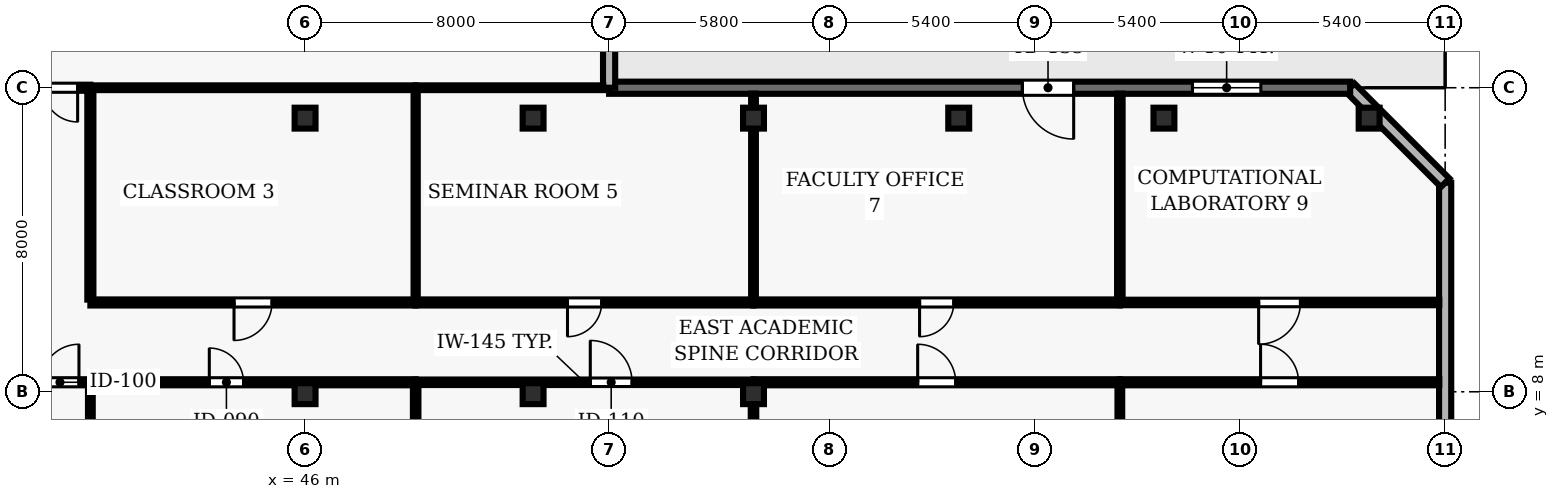
"""IFC4 building model, lengths in metres.
Left out: names, types, materials, properties, quantities, classifications, styles, units other than length and angle.
Written with IfcOpenShell. Run it as: python <this file> out.ifc"""

import sys

from ifc_helpers import new_model, si_unit, direction, frame, frame_2d, origin, origin_2d, place, context, subcontext, project, spatial, rectangle, hollow_rectangle, extrude, element, fill, save


model = new_model("IFC4")
c1 = context("Model", 3, precision=1e-05, world=origin(), true_north=direction((0.0, 1.0)))
c2 = subcontext(c1, "Body", "Model", "MODEL_VIEW")
j1 = project(units=[si_unit("LENGTHUNIT", "METRE"), si_unit("PLANEANGLEUNIT", "RADIAN")], contexts=[c1])
p1 = place(None, origin())
s1 = spatial("IfcSite", under=j1, at=p1, CompositionType="ELEMENT")
p2 = place(p1, origin())
s2 = spatial("IfcBuilding", under=s1, at=p2, CompositionType="ELEMENT")
p3 = place(p2, frame((0.0, 0.0, 26.0)))
s3 = spatial("IfcBuildingStorey", under=s2, at=p3, CompositionType="ELEMENT", Elevation=26.0)
for number, where, z_axis, x_axis in (
    (1, (46.0, 7.95, 0.0), (0.0, 0.0, 1.0), (1.0, 0.0, 0.0)),
    (2, (46.0, 15.2, 0.0), (0.0, 0.0, 1.0), (1.0, 0.0, 0.0)),
    (3, (52.0, 7.95, 0.0), (0.0, 0.0, 1.0), (1.0, 0.0, 0.0)),
    (4, (52.0, 15.2, 0.0), (0.0, 0.0, 1.0), (1.0, 0.0, 0.0)),
    (5, (57.8, 7.95, 0.0), (0.0, 0.0, 1.0), (1.0, 0.0, 0.0)),
    (6, (57.8, 15.2, 0.0), (0.0, 0.0, 1.0), (1.0, 0.0, 0.0)),
    (7, (63.2, 15.2, 0.0), (0.0, 0.0, 1.0), (1.0, 0.0, 0.0)),
    (8, (68.6, 15.2, 0.0), (0.0, 0.0, 1.0), (1.0, 0.0, 0.0)),
    (9, (74.0, 15.2, 0.0), (0.0, 0.0, 1.0), (1.0, 0.0, 0.0)),
):
    element("IfcColumn", number, at=place(p3, frame(where, z_axis=z_axis, x_axis=x_axis)), inside=s3, PredefinedType="COLUMN", context=c2, shape_type="SweptSolid", body=[
        extrude(hollow_rectangle(XDim=0.55, YDim=0.55, WallThickness=0.025, at=origin_2d()), origin(), (0.0, 0.0, 1.0), 5.0),
    ])
p4 = place(p3, frame((76.0, 2.5, 0.0), z_axis=(0.0, 0.0, 1.0), x_axis=(0.0, 1.0, 0.0)))
e10 = element("IfcWall", 10, at=p4, inside=s3, PredefinedType="SOLIDWALL", context=c2, shape_type="SweptSolid", body=[
    extrude(rectangle(XDim=11.0, YDim=0.32, at=frame_2d((5.5, 0.0))), origin(), (0.0, 0.0, 1.0), 4.79),
])
p5 = place(p4, frame((1.55, 0.0, 0.9)))
e11 = element("IfcOpeningElement", 11, at=p5, cuts=e10, PredefinedType="OPENING", context=c2, shape_type="SweptSolid", body=[
    extrude(rectangle(XDim=2.4, YDim=1.8, at=frame_2d((1.2, 0.9))), frame((0.0, 0.17, 0.0), z_axis=(0.0, -1.0, 0.0), x_axis=(1.0, 0.0, 0.0)), (0.0, 0.0, 1.0), 0.34),
])
p6 = place(p3, frame((76.0, 13.5, 0.0), z_axis=(0.0, 0.0, 1.0), x_axis=(-0.707106781187, 0.707106781187, 0.0)))
e12 = element("IfcWall", 12, at=p6, inside=s3, PredefinedType="SOLIDWALL", context=c2, shape_type="SweptSolid", body=[
    extrude(rectangle(XDim=3.536, YDim=0.32, at=frame_2d((1.768, 0.0))), origin(), (0.0, 0.0, 1.0), 4.79),
])
p7 = place(p3, frame((73.5, 16.0, 0.0), z_axis=(0.0, 0.0, 1.0), x_axis=(-1.0, 0.0, 0.0)))
e13 = element("IfcWall", 13, at=p7, inside=s3, PredefinedType="SOLIDWALL", context=c2, shape_type="SweptSolid", body=[
    extrude(rectangle(XDim=19.5, YDim=0.32, at=frame_2d((9.75, 0.0))), origin(), (0.0, 0.0, 1.0), 4.79),
])
p8 = place(p7, frame((7.275, 0.0, 0.0)))
e14 = element("IfcOpeningElement", 14, at=p8, cuts=e13, PredefinedType="OPENING", context=c2, shape_type="SweptSolid", body=[
    extrude(rectangle(XDim=1.35, YDim=2.2, at=frame_2d((0.675, 1.1))), frame((0.0, 0.17, 0.0), z_axis=(0.0, -1.0, 0.0), x_axis=(1.0, 0.0, 0.0)), (0.0, 0.0, 1.0), 0.34),
])
p9 = place(p7, frame((2.35, 0.0, 0.9)))
e15 = element("IfcOpeningElement", 15, at=p9, cuts=e13, PredefinedType="OPENING", context=c2, shape_type="SweptSolid", body=[
    extrude(rectangle(XDim=1.8, YDim=2.2, at=frame_2d((0.9, 1.1))), frame((0.0, 0.17, 0.0), z_axis=(0.0, -1.0, 0.0), x_axis=(1.0, 0.0, 0.0)), (0.0, 0.0, 1.0), 0.34),
])
p10 = place(p3, frame((54.0, 16.0, 0.0), z_axis=(0.0, 0.0, 1.0), x_axis=(0.0, 1.0, 0.0)))
e16 = element("IfcWall", 16, at=p10, inside=s3, PredefinedType="SOLIDWALL", context=c2, shape_type="SweptSolid", body=[
    extrude(rectangle(XDim=14.8, YDim=0.32, at=frame_2d((7.4, 0.0))), origin(), (0.0, 0.0, 1.0), 4.79),
])
p11 = place(p10, frame((2.5, 0.0, 0.9)))
e17 = element("IfcOpeningElement", 17, at=p11, cuts=e16, PredefinedType="OPENING", context=c2, shape_type="SweptSolid", body=[
    extrude(rectangle(XDim=2.4, YDim=2.2, at=frame_2d((1.2, 1.1))), frame((0.0, 0.17, 0.0), z_axis=(0.0, -1.0, 0.0), x_axis=(1.0, 0.0, 0.0)), (0.0, 0.0, 1.0), 0.34),
])
p12 = place(p10, frame((9.9, 0.0, 0.9)))
e18 = element("IfcOpeningElement", 18, at=p12, cuts=e16, PredefinedType="OPENING", context=c2, shape_type="SweptSolid", body=[
    extrude(rectangle(XDim=2.4, YDim=2.2, at=frame_2d((1.2, 1.1))), frame((0.0, 0.17, 0.0), z_axis=(0.0, -1.0, 0.0), x_axis=(1.0, 0.0, 0.0)), (0.0, 0.0, 1.0), 0.34),
])
p13 = place(p3, frame((38.05, 8.25, 0.0), z_axis=(0.0, 0.0, 1.0), x_axis=(1.0, 0.0, 0.0)))
e19 = element("IfcWall", 19, at=p13, inside=s3, PredefinedType="PARTITIONING", context=c2, shape_type="SweptSolid", body=[
    extrude(rectangle(XDim=2.3, YDim=0.16, at=frame_2d((1.15, 0.0))), origin(), (0.0, 0.0, 1.0), 4.155),
])
p14 = place(p13, frame((1.0, 0.0, 0.0)))
e20 = element("IfcOpeningElement", 20, at=p14, cuts=e19, PredefinedType="OPENING", context=c2, shape_type="SweptSolid", body=[
    extrude(rectangle(XDim=1.0, YDim=2.1, at=frame_2d((0.5, 1.05))), frame((0.0, 0.09, 0.0), z_axis=(0.0, -1.0, 0.0), x_axis=(1.0, 0.0, 0.0)), (0.0, 0.0, 1.0), 0.18),
])
p15 = place(p3, frame((40.35, 8.25, 0.0), z_axis=(0.0, 0.0, 1.0), x_axis=(1.0, 0.0, 0.0)))
e21 = element("IfcWall", 21, at=p15, inside=s3, PredefinedType="PARTITIONING", context=c2, shape_type="SweptSolid", body=[
    extrude(rectangle(XDim=8.56, YDim=0.16, at=frame_2d((4.28, 0.0))), origin(), (0.0, 0.0, 1.0), 4.155),
])
p16 = place(p15, frame((3.13, 0.0, 0.0)))
e22 = element("IfcOpeningElement", 22, at=p16, cuts=e21, PredefinedType="OPENING", context=c2, shape_type="SweptSolid", body=[
    extrude(rectangle(XDim=0.9, YDim=2.1, at=frame_2d((0.45, 1.05))), frame((0.0, 0.09, 0.0), z_axis=(0.0, -1.0, 0.0), x_axis=(1.0, 0.0, 0.0)), (0.0, 0.0, 1.0), 0.18),
])
p17 = place(p3, frame((40.35, 16.0, 0.0), z_axis=(0.0, 0.0, 1.0), x_axis=(-1.0, 0.0, 0.0)))
e23 = element("IfcWall", 23, at=p17, inside=s3, PredefinedType="PARTITIONING", context=c2, shape_type="SweptSolid", body=[
    extrude(rectangle(XDim=2.27, YDim=0.16, at=frame_2d((1.135, 0.0))), origin(), (0.0, 0.0, 1.0), 4.79),
])
p18 = place(p17, frame((0.335, 0.0, 0.0)))
e24 = element("IfcOpeningElement", 24, at=p18, cuts=e23, PredefinedType="OPENING", context=c2, shape_type="SweptSolid", body=[
    extrude(rectangle(XDim=0.9, YDim=2.1, at=frame_2d((0.45, 1.05))), frame((0.0, 0.09, 0.0), z_axis=(0.0, -1.0, 0.0), x_axis=(1.0, 0.0, 0.0)), (0.0, 0.0, 1.0), 0.18),
])
p19 = place(p3, frame((48.91, 8.25, 0.0), z_axis=(0.0, 0.0, 1.0), x_axis=(1.0, 0.0, 0.0)))
e25 = element("IfcWall", 25, at=p19, inside=s3, PredefinedType="PARTITIONING", context=c2, shape_type="SweptSolid", body=[
    extrude(rectangle(XDim=8.89, YDim=0.145, at=frame_2d((4.445, 0.0))), origin(), (0.0, 0.0, 1.0), 4.155),
])
p20 = place(p19, frame((4.595, 0.0, 0.0)))
e26 = element("IfcOpeningElement", 26, at=p20, cuts=e25, PredefinedType="OPENING", context=c2, shape_type="SweptSolid", body=[
    extrude(rectangle(XDim=1.1, YDim=2.15, at=frame_2d((0.55, 1.075))), frame((0.0, 0.083, 0.0), z_axis=(0.0, -1.0, 0.0), x_axis=(1.0, 0.0, 0.0)), (0.0, 0.0, 1.0), 0.165),
])
p21 = place(p3, frame((48.91, 10.35, 0.0), z_axis=(0.0, 0.0, 1.0), x_axis=(-1.0, 0.0, 0.0)))
e27 = element("IfcWall", 27, at=p21, inside=s3, PredefinedType="PARTITIONING", context=c2, shape_type="SweptSolid", body=[
    extrude(rectangle(XDim=8.56, YDim=0.16, at=frame_2d((4.28, 0.0))), origin(), (0.0, 0.0, 1.0), 4.377),
])
p22 = place(p21, frame((3.78, 0.0, 0.0)))
e28 = element("IfcOpeningElement", 28, at=p22, cuts=e27, PredefinedType="OPENING", context=c2, shape_type="SweptSolid", body=[
    extrude(rectangle(XDim=1.0, YDim=2.1, at=frame_2d((0.5, 1.05))), frame((0.0, 0.09, 0.0), z_axis=(0.0, -1.0, 0.0), x_axis=(1.0, 0.0, 0.0)), (0.0, 0.0, 1.0), 0.18),
])
p23 = place(p3, frame((48.91, 16.0, 0.0), z_axis=(0.0, 0.0, 1.0), x_axis=(1.0, 0.0, 0.0)))
e29 = element("IfcWall", 29, at=p23, inside=s3, PredefinedType="PARTITIONING", context=c2, shape_type="SweptSolid", body=[
    extrude(rectangle(XDim=4.935, YDim=0.125, at=frame_2d((2.468, 0.0))), origin(), (0.0, 0.0, 1.0), 4.79),
])
p24 = place(p3, frame((48.91, 16.0, 0.0), z_axis=(0.0, 0.0, 1.0), x_axis=(-1.0, 0.0, 0.0)))
e30 = element("IfcWall", 30, at=p24, inside=s3, PredefinedType="PARTITIONING", context=c2, shape_type="SweptSolid", body=[
    extrude(rectangle(XDim=8.56, YDim=0.125, at=frame_2d((4.28, 0.0))), origin(), (0.0, 0.0, 1.0), 4.79),
])
p25 = place(p3, frame((57.8, 8.25, 0.0), z_axis=(0.0, 0.0, 1.0), x_axis=(1.0, 0.0, 0.0)))
e31 = element("IfcWall", 31, at=p25, inside=s3, PredefinedType="PARTITIONING", context=c2, shape_type="SweptSolid", body=[
    extrude(rectangle(XDim=9.64, YDim=0.16, at=frame_2d((4.82, 0.0))), origin(), (0.0, 0.0, 1.0), 4.79),
])
p26 = place(p25, frame((4.32, 0.0, 0.0)))
e32 = element("IfcOpeningElement", 32, at=p26, cuts=e31, PredefinedType="OPENING", context=c2, shape_type="SweptSolid", body=[
    extrude(rectangle(XDim=1.0, YDim=2.1, at=frame_2d((0.5, 1.05))), frame((0.0, 0.09, 0.0), z_axis=(0.0, -1.0, 0.0), x_axis=(1.0, 0.0, 0.0)), (0.0, 0.0, 1.0), 0.18),
])
p27 = place(p3, frame((57.8, 10.35, 0.0), z_axis=(0.0, 0.0, 1.0), x_axis=(-1.0, 0.0, 0.0)))
e33 = element("IfcWall", 33, at=p27, inside=s3, PredefinedType="PARTITIONING", context=c2, shape_type="SweptSolid", body=[
    extrude(rectangle(XDim=8.89, YDim=0.16, at=frame_2d((4.445, 0.0))), origin(), (0.0, 0.0, 1.0), 4.377),
])
p28 = place(p27, frame((3.995, 0.0, 0.0)))
e34 = element("IfcOpeningElement", 34, at=p28, cuts=e33, PredefinedType="OPENING", context=c2, shape_type="SweptSolid", body=[
    extrude(rectangle(XDim=0.9, YDim=2.1, at=frame_2d((0.45, 1.05))), frame((0.0, 0.09, 0.0), z_axis=(0.0, -1.0, 0.0), x_axis=(1.0, 0.0, 0.0)), (0.0, 0.0, 1.0), 0.18),
])
p29 = place(p3, frame((67.44, 8.25, 0.0), z_axis=(0.0, 0.0, 1.0), x_axis=(1.0, 0.0, 0.0)))
e35 = element("IfcWall", 35, at=p29, inside=s3, PredefinedType="PARTITIONING", context=c2, shape_type="SweptSolid", body=[
    extrude(rectangle(XDim=8.405, YDim=0.16, at=frame_2d((4.203, 0.0))), origin(), (0.0, 0.0, 1.0), 4.79),
])
p30 = place(p29, frame((3.703, 0.0, 0.0)))
e36 = element("IfcOpeningElement", 36, at=p30, cuts=e35, PredefinedType="OPENING", context=c2, shape_type="SweptSolid", body=[
    extrude(rectangle(XDim=1.0, YDim=2.1, at=frame_2d((0.5, 1.05))), frame((0.0, 0.09, 0.0), z_axis=(0.0, -1.0, 0.0), x_axis=(1.0, 0.0, 0.0)), (0.0, 0.0, 1.0), 0.18),
])
p31 = place(p3, frame((67.44, 10.35, 0.0), z_axis=(0.0, 0.0, 1.0), x_axis=(-1.0, 0.0, 0.0)))
e37 = element("IfcWall", 37, at=p31, inside=s3, PredefinedType="PARTITIONING", context=c2, shape_type="SweptSolid", body=[
    extrude(rectangle(XDim=9.64, YDim=0.16, at=frame_2d((4.82, 0.0))), origin(), (0.0, 0.0, 1.0), 4.377),
])
p32 = place(p31, frame((4.37, 0.0, 0.0)))
e38 = element("IfcOpeningElement", 38, at=p32, cuts=e37, PredefinedType="OPENING", context=c2, shape_type="SweptSolid", body=[
    extrude(rectangle(XDim=0.9, YDim=2.1, at=frame_2d((0.45, 1.05))), frame((0.0, 0.09, 0.0), z_axis=(0.0, -1.0, 0.0), x_axis=(1.0, 0.0, 0.0)), (0.0, 0.0, 1.0), 0.18),
])
p33 = place(p3, frame((75.845, 10.35, 0.0), z_axis=(0.0, 0.0, 1.0), x_axis=(-1.0, 0.0, 0.0)))
e39 = element("IfcWall", 39, at=p33, inside=s3, PredefinedType="PARTITIONING", context=c2, shape_type="SweptSolid", body=[
    extrude(rectangle(XDim=8.405, YDim=0.145, at=frame_2d((4.203, 0.0))), origin(), (0.0, 0.0, 1.0), 4.377),
])
p34 = place(p33, frame((3.653, 0.0, 0.0)))
e40 = element("IfcOpeningElement", 40, at=p34, cuts=e39, PredefinedType="OPENING", context=c2, shape_type="SweptSolid", body=[
    extrude(rectangle(XDim=1.1, YDim=2.15, at=frame_2d((0.55, 1.075))), frame((0.0, 0.083, 0.0), z_axis=(0.0, -1.0, 0.0), x_axis=(1.0, 0.0, 0.0)), (0.0, 0.0, 1.0), 0.165),
])
p35 = place(p3, frame((40.35, 0.155, 0.0), z_axis=(0.0, 0.0, 1.0), x_axis=(0.0, 1.0, 0.0)))
e41 = element("IfcWall", 41, at=p35, inside=s3, PredefinedType="PARTITIONING", context=c2, shape_type="SweptSolid", body=[
    extrude(rectangle(XDim=8.02, YDim=0.125, at=frame_2d((4.01, 0.0))), origin(), (0.0, 0.0, 1.0), 4.79),
])
p36 = place(p3, frame((40.35, 10.425, 0.0), z_axis=(0.0, 0.0, 1.0), x_axis=(0.0, 1.0, 0.0)))
e42 = element("IfcWall", 42, at=p36, inside=s3, PredefinedType="PARTITIONING", context=c2, shape_type="SweptSolid", body=[
    extrude(rectangle(XDim=5.5, YDim=0.16, at=frame_2d((2.75, 0.0))), origin(), (0.0, 0.0, 1.0), 4.377),
])
p37 = place(p3, frame((48.91, 0.155, 0.0), z_axis=(0.0, 0.0, 1.0), x_axis=(0.0, 1.0, 0.0)))
e43 = element("IfcWall", 43, at=p37, inside=s3, PredefinedType="PARTITIONING", context=c2, shape_type="SweptSolid", body=[
    extrude(rectangle(XDim=8.02, YDim=0.145, at=frame_2d((4.01, 0.0))), origin(), (0.0, 0.0, 1.0), 4.79),
])
p38 = place(p3, frame((48.91, 10.425, 0.0), z_axis=(0.0, 0.0, 1.0), x_axis=(0.0, 1.0, 0.0)))
e44 = element("IfcWall", 44, at=p38, inside=s3, PredefinedType="MOVABLE", context=c2, shape_type="SweptSolid", body=[
    extrude(rectangle(XDim=5.518, YDim=0.11, at=frame_2d((2.759, 0.0))), origin(), (0.0, 0.0, 1.0), 4.79),
])
p39 = place(p3, frame((57.8, 0.155, 0.0), z_axis=(0.0, 0.0, 1.0), x_axis=(0.0, 1.0, 0.0)))
e45 = element("IfcWall", 45, at=p39, inside=s3, PredefinedType="PARTITIONING", context=c2, shape_type="SweptSolid", body=[
    extrude(rectangle(XDim=8.02, YDim=0.145, at=frame_2d((4.01, 0.0))), origin(), (0.0, 0.0, 1.0), 4.155),
])
p40 = place(p3, frame((57.8, 10.425, 0.0), z_axis=(0.0, 0.0, 1.0), x_axis=(0.0, 1.0, 0.0)))
e46 = element("IfcWall", 46, at=p40, inside=s3, PredefinedType="PARTITIONING", context=c2, shape_type="SweptSolid", body=[
    extrude(rectangle(XDim=5.42, YDim=0.125, at=frame_2d((2.71, 0.0))), origin(), (0.0, 0.0, 1.0), 4.155),
])
p41 = place(p3, frame((67.44, 0.155, 0.0), z_axis=(0.0, 0.0, 1.0), x_axis=(0.0, 1.0, 0.0)))
e47 = element("IfcWall", 47, at=p41, inside=s3, PredefinedType="PARTITIONING", context=c2, shape_type="SweptSolid", body=[
    extrude(rectangle(XDim=8.02, YDim=0.125, at=frame_2d((4.01, 0.0))), origin(), (0.0, 0.0, 1.0), 4.79),
])
p42 = place(p3, frame((67.44, 10.425, 0.0), z_axis=(0.0, 0.0, 1.0), x_axis=(0.0, 1.0, 0.0)))
e48 = element("IfcWall", 48, at=p42, inside=s3, PredefinedType="PARTITIONING", context=c2, shape_type="SweptSolid", body=[
    extrude(rectangle(XDim=5.42, YDim=0.145, at=frame_2d((2.71, 0.0))), origin(), (0.0, 0.0, 1.0), 4.79),
])
p43 = place(p8, origin())
e49 = element("IfcDoor", 49, at=p43, inside=s3, OperationType="SINGLE_SWING_LEFT", PredefinedType="DOOR", context=c2, shape_type="SweptSolid", body=[
    extrude(rectangle(XDim=1.35, YDim=2.2, at=frame_2d((0.675, 1.1))), frame((0.0, 0.025, 0.0), z_axis=(0.0, -1.0, 0.0), x_axis=(1.0, 0.0, 0.0)), (0.0, 0.0, 1.0), 0.05),
])
fill(e14, e49)
p44 = place(p9, origin())
e50 = element("IfcWindow", 50, at=p44, inside=s3, PartitioningType="SINGLE_PANEL", PredefinedType="WINDOW", context=c2, shape_type="SweptSolid", body=[
    extrude(rectangle(XDim=1.8, YDim=2.2, at=frame_2d((0.9, 1.1))), frame((0.0, 0.03, 0.0), z_axis=(0.0, -1.0, 0.0), x_axis=(1.0, 0.0, 0.0)), (0.0, 0.0, 1.0), 0.06),
])
fill(e15, e50)
p45 = place(p14, origin())
e51 = element("IfcDoor", 51, at=p45, inside=s3, OperationType="SINGLE_SWING_RIGHT", PredefinedType="DOOR", context=c2, shape_type="SweptSolid", body=[
    extrude(rectangle(XDim=1.0, YDim=2.1, at=frame_2d((0.5, 1.05))), frame((0.0, 0.025, 0.0), z_axis=(0.0, -1.0, 0.0), x_axis=(1.0, 0.0, 0.0)), (0.0, 0.0, 1.0), 0.05),
])
fill(e20, e51)
p46 = place(p16, origin())
e52 = element("IfcDoor", 52, at=p46, inside=s3, OperationType="SINGLE_SWING_LEFT", PredefinedType="DOOR", context=c2, shape_type="SweptSolid", body=[
    extrude(rectangle(XDim=0.9, YDim=2.1, at=frame_2d((0.45, 1.05))), frame((0.0, 0.025, 0.0), z_axis=(0.0, -1.0, 0.0), x_axis=(1.0, 0.0, 0.0)), (0.0, 0.0, 1.0), 0.05),
])
fill(e22, e52)
p47 = place(p22, origin())
e53 = element("IfcDoor", 53, at=p47, inside=s3, OperationType="SINGLE_SWING_RIGHT", PredefinedType="DOOR", context=c2, shape_type="SweptSolid", body=[
    extrude(rectangle(XDim=1.0, YDim=2.1, at=frame_2d((0.5, 1.05))), frame((0.0, 0.025, 0.0), z_axis=(0.0, -1.0, 0.0), x_axis=(1.0, 0.0, 0.0)), (0.0, 0.0, 1.0), 0.05),
])
fill(e28, e53)
p48 = place(p20, origin())
e54 = element("IfcDoor", 54, at=p48, inside=s3, OperationType="SINGLE_SWING_LEFT", PredefinedType="DOOR", context=c2, shape_type="SweptSolid", body=[
    extrude(rectangle(XDim=1.1, YDim=2.15, at=frame_2d((0.55, 1.075))), frame((0.0, 0.025, 0.0), z_axis=(0.0, -1.0, 0.0), x_axis=(1.0, 0.0, 0.0)), (0.0, 0.0, 1.0), 0.05),
])
fill(e26, e54)
p49 = place(p28, origin())
e55 = element("IfcDoor", 55, at=p49, inside=s3, OperationType="SINGLE_SWING_RIGHT", PredefinedType="DOOR", context=c2, shape_type="SweptSolid", body=[
    extrude(rectangle(XDim=0.9, YDim=2.1, at=frame_2d((0.45, 1.05))), frame((0.0, 0.025, 0.0), z_axis=(0.0, -1.0, 0.0), x_axis=(1.0, 0.0, 0.0)), (0.0, 0.0, 1.0), 0.05),
])
fill(e34, e55)
p50 = place(p26, origin())
e56 = element("IfcDoor", 56, at=p50, inside=s3, OperationType="SINGLE_SWING_LEFT", PredefinedType="DOOR", context=c2, shape_type="SweptSolid", body=[
    extrude(rectangle(XDim=1.0, YDim=2.1, at=frame_2d((0.5, 1.05))), frame((0.0, 0.025, 0.0), z_axis=(0.0, -1.0, 0.0), x_axis=(1.0, 0.0, 0.0)), (0.0, 0.0, 1.0), 0.05),
])
fill(e32, e56)
p51 = place(p32, origin())
e57 = element("IfcDoor", 57, at=p51, inside=s3, OperationType="SINGLE_SWING_RIGHT", PredefinedType="DOOR", context=c2, shape_type="SweptSolid", body=[
    extrude(rectangle(XDim=0.9, YDim=2.1, at=frame_2d((0.45, 1.05))), frame((0.0, 0.025, 0.0), z_axis=(0.0, -1.0, 0.0), x_axis=(1.0, 0.0, 0.0)), (0.0, 0.0, 1.0), 0.05),
])
fill(e38, e57)
p52 = place(p30, origin())
e58 = element("IfcDoor", 58, at=p52, inside=s3, OperationType="SINGLE_SWING_LEFT", PredefinedType="DOOR", context=c2, shape_type="SweptSolid", body=[
    extrude(rectangle(XDim=1.0, YDim=2.1, at=frame_2d((0.5, 1.05))), frame((0.0, 0.025, 0.0), z_axis=(0.0, -1.0, 0.0), x_axis=(1.0, 0.0, 0.0)), (0.0, 0.0, 1.0), 0.05),
])
fill(e36, e58)
p53 = place(p34, origin())
e59 = element("IfcDoor", 59, at=p53, inside=s3, OperationType="SINGLE_SWING_RIGHT", PredefinedType="DOOR", context=c2, shape_type="SweptSolid", body=[
    extrude(rectangle(XDim=1.1, YDim=2.15, at=frame_2d((0.55, 1.075))), frame((0.0, 0.025, 0.0), z_axis=(0.0, -1.0, 0.0), x_axis=(1.0, 0.0, 0.0)), (0.0, 0.0, 1.0), 0.05),
])
fill(e40, e59)
p54 = place(p18, origin())
e60 = element("IfcDoor", 60, at=p54, inside=s3, OperationType="SINGLE_SWING_LEFT", PredefinedType="DOOR", context=c2, shape_type="SweptSolid", body=[
    extrude(rectangle(XDim=0.9, YDim=2.1, at=frame_2d((0.45, 1.05))), frame((0.0, 0.025, 0.0), z_axis=(0.0, -1.0, 0.0), x_axis=(1.0, 0.0, 0.0)), (0.0, 0.0, 1.0), 0.05),
])
fill(e24, e60)
save(model, sys.argv[1])
